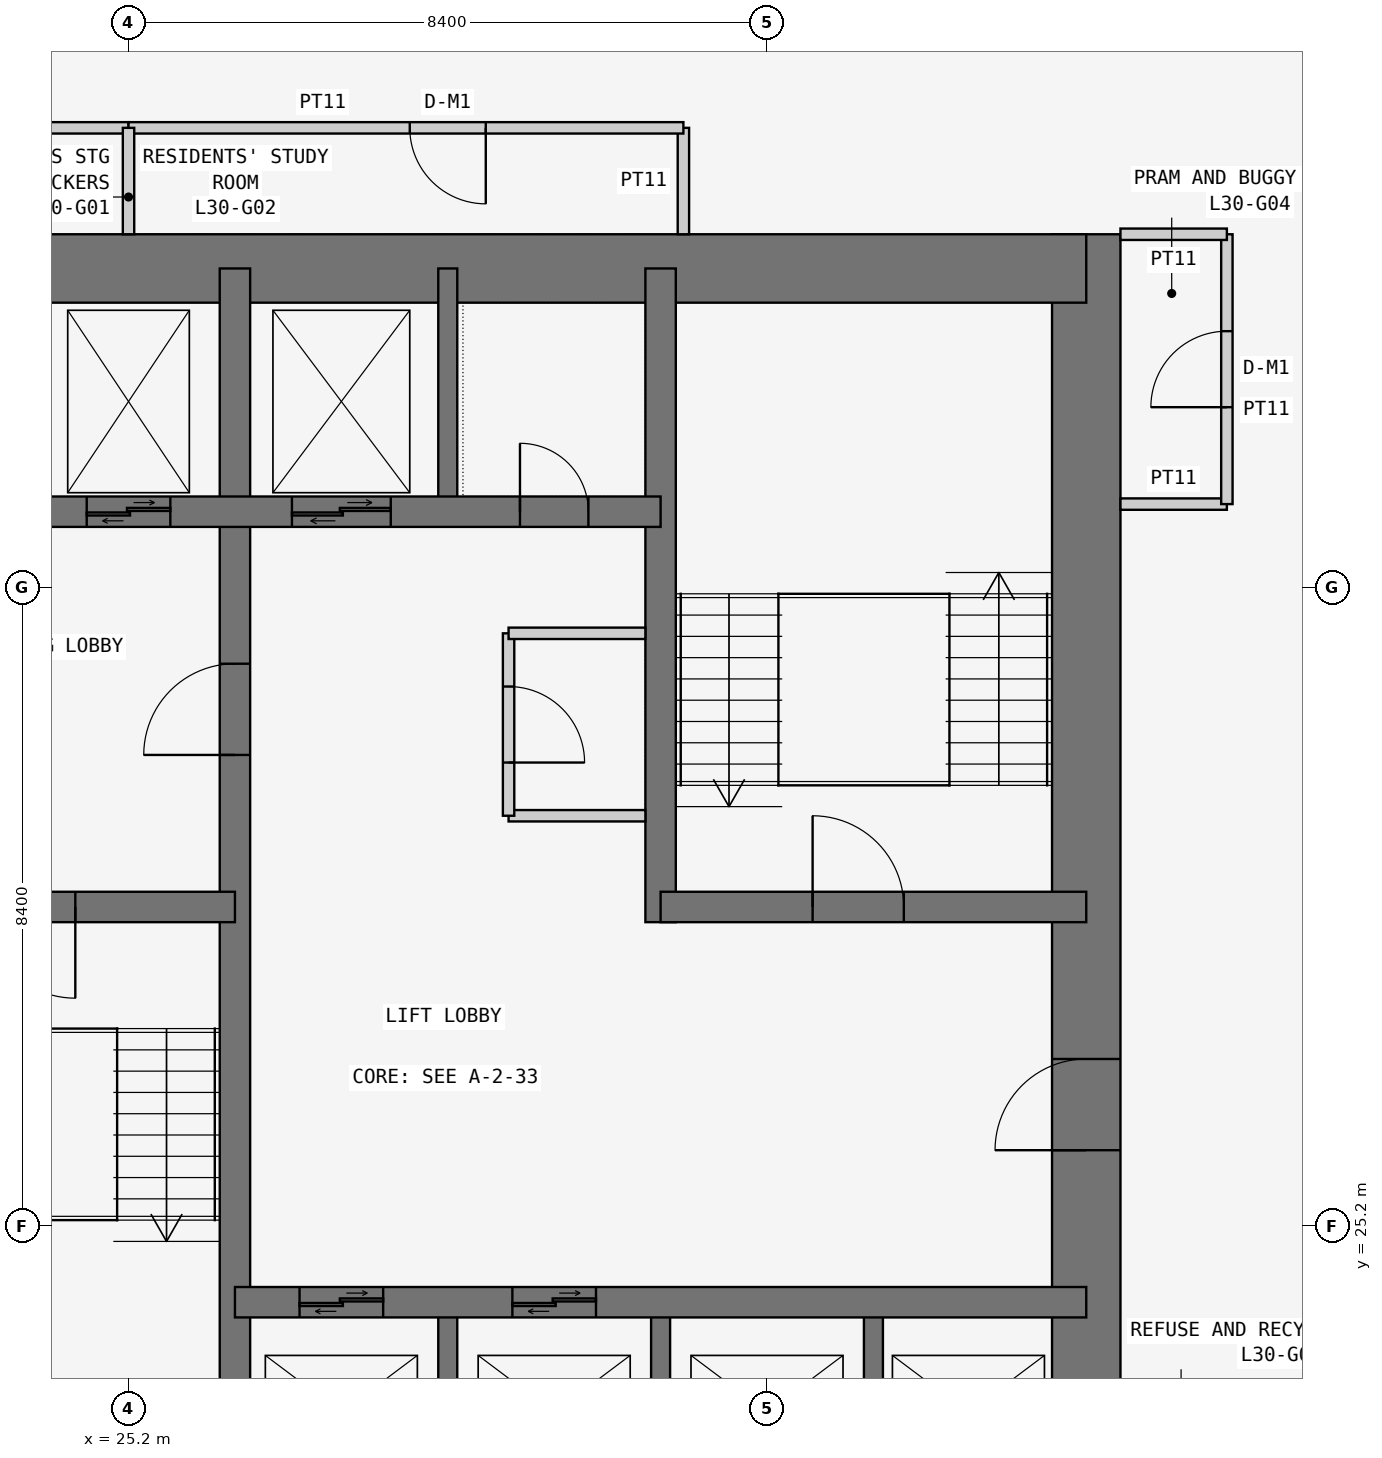
"""IFC4 building model, lengths in metres.
Left out: names, types, materials, properties, quantities, classifications, styles, units other than length and angle.
Written with IfcOpenShell. Run it as: python <this file> out.ifc"""

import sys

from ifc_helpers import new_model, si_unit, direction, frame, frame_2d, origin, place, context, subcontext, project, spatial, rectangle, extrude, element, fill, save


model = new_model("IFC4")
c1 = context("Model", 3, precision=1e-05, world=origin(), true_north=direction((0.0, 1.0)))
c2 = subcontext(c1, "Body", "Model", "MODEL_VIEW")
j1 = project(units=[si_unit("LENGTHUNIT", "METRE"), si_unit("PLANEANGLEUNIT", "RADIAN")], contexts=[c1])
p1 = place(None, origin())
s1 = spatial("IfcSite", under=j1, at=p1, CompositionType="ELEMENT")
p2 = place(p1, origin())
s2 = spatial("IfcBuilding", under=s1, at=p2, CompositionType="ELEMENT")
p3 = place(p2, frame((0.0, 0.0, 119.7)))
s3 = spatial("IfcBuildingStorey", under=s2, at=p3, CompositionType="ELEMENT", Elevation=119.7)
p4 = place(p3, frame((37.8, 21.0, 0.0), z_axis=(0.0, 0.0, 1.0), x_axis=(0.0, 1.0, 0.0)))
e1 = element("IfcWall", 1, at=p4, inside=s3, PredefinedType="SHEAR", context=c2, shape_type="SweptSolid", body=[
    extrude(rectangle(XDim=17.25, YDim=0.9, at=frame_2d((8.625, 0.0))), origin(), (0.0, 0.0, 1.0), 3.6),
])
p5 = place(p4, frame((5.2, 0.0, 0.0)))
e2 = element("IfcOpeningElement", 2, at=p5, cuts=e1, PredefinedType="OPENING", context=c2, shape_type="SweptSolid", body=[
    extrude(rectangle(XDim=1.2, YDim=2.1, at=frame_2d((0.6, 1.05))), frame((0.0, 0.46, 0.0), z_axis=(0.0, -1.0, 0.0), x_axis=(1.0, 0.0, 0.0)), (0.0, 0.0, 1.0), 0.92),
])
p6 = place(p3, frame((37.8, 37.8, 0.0), z_axis=(0.0, 0.0, 1.0), x_axis=(-1.0, 0.0, 0.0)))
e3 = element("IfcWall", 3, at=p6, inside=s3, PredefinedType="SHEAR", context=c2, shape_type="SweptSolid", body=[
    extrude(rectangle(XDim=17.25, YDim=0.9, at=frame_2d((8.625, 0.0))), origin(), (0.0, 0.0, 1.0), 3.6),
])
p7 = place(p3, frame((26.6, 21.0, 0.0), z_axis=(0.0, 0.0, 1.0), x_axis=(0.0, 1.0, 0.0)))
e4 = element("IfcWall", 4, at=p7, inside=s3, PredefinedType="SHEAR", context=c2, shape_type="SweptSolid", body=[
    extrude(rectangle(XDim=16.8, YDim=0.4, at=frame_2d((8.4, 0.0))), origin(), (0.0, 0.0, 1.0), 3.6),
])
p8 = place(p7, frame((10.4, 0.0, 0.0)))
e5 = element("IfcOpeningElement", 5, at=p8, cuts=e4, PredefinedType="OPENING", context=c2, shape_type="SweptSolid", body=[
    extrude(rectangle(XDim=1.2, YDim=2.1, at=frame_2d((0.6, 1.05))), frame((0.0, 0.21, 0.0), z_axis=(0.0, -1.0, 0.0), x_axis=(1.0, 0.0, 0.0)), (0.0, 0.0, 1.0), 0.42),
])
p9 = place(p3, frame((21.0, 29.4, 0.0), z_axis=(0.0, 0.0, 1.0), x_axis=(1.0, 0.0, 0.0)))
e6 = element("IfcWall", 6, at=p9, inside=s3, PredefinedType="SHEAR", context=c2, shape_type="SweptSolid", body=[
    extrude(rectangle(XDim=5.6, YDim=0.4, at=frame_2d((2.8, 0.0))), origin(), (0.0, 0.0, 1.0), 3.6),
])
p10 = place(p9, frame((2.3, 0.0, 0.0)))
e7 = element("IfcOpeningElement", 7, at=p10, cuts=e6, PredefinedType="OPENING", context=c2, shape_type="SweptSolid", body=[
    extrude(rectangle(XDim=1.2, YDim=2.1, at=frame_2d((0.6, 1.05))), frame((0.0, 0.21, 0.0), z_axis=(0.0, -1.0, 0.0), x_axis=(1.0, 0.0, 0.0)), (0.0, 0.0, 1.0), 0.42),
])
p11 = place(p3, frame((21.0, 34.6, 0.0), z_axis=(0.0, 0.0, 1.0), x_axis=(1.0, 0.0, 0.0)))
e8 = element("IfcWall", 8, at=p11, inside=s3, PredefinedType="SHEAR", context=c2, shape_type="SweptSolid", body=[
    extrude(rectangle(XDim=11.2, YDim=0.4, at=frame_2d((5.6, 0.0))), origin(), (0.0, 0.0, 1.0), 3.6),
])
p12 = place(p11, frame((9.35, 0.0, 0.0)))
e9 = element("IfcOpeningElement", 9, at=p12, cuts=e8, PredefinedType="OPENING", context=c2, shape_type="SweptSolid", body=[
    extrude(rectangle(XDim=0.9, YDim=2.1, at=frame_2d((0.45, 1.05))), frame((0.0, 0.21, 0.0), z_axis=(0.0, -1.0, 0.0), x_axis=(1.0, 0.0, 0.0)), (0.0, 0.0, 1.0), 0.42),
])
p13 = place(p11, frame((1.0, 0.0, 0.0)))
e10 = element("IfcOpeningElement", 10, at=p13, cuts=e8, PredefinedType="OPENING", context=c2, shape_type="SweptSolid", body=[
    extrude(rectangle(XDim=1.1, YDim=2.1, at=frame_2d((0.55, 1.05))), frame((0.0, 0.21, 0.0), z_axis=(0.0, -1.0, 0.0), x_axis=(1.0, 0.0, 0.0)), (0.0, 0.0, 1.0), 0.42),
])
p14 = place(p11, frame((3.65, 0.0, 0.0)))
e11 = element("IfcOpeningElement", 11, at=p14, cuts=e8, PredefinedType="OPENING", context=c2, shape_type="SweptSolid", body=[
    extrude(rectangle(XDim=1.1, YDim=2.1, at=frame_2d((0.55, 1.05))), frame((0.0, 0.21, 0.0), z_axis=(0.0, -1.0, 0.0), x_axis=(1.0, 0.0, 0.0)), (0.0, 0.0, 1.0), 0.42),
])
p15 = place(p11, frame((6.35, 0.0, 0.0)))
e12 = element("IfcOpeningElement", 12, at=p15, cuts=e8, PredefinedType="OPENING", context=c2, shape_type="SweptSolid", body=[
    extrude(rectangle(XDim=1.3, YDim=2.1, at=frame_2d((0.65, 1.05))), frame((0.0, 0.21, 0.0), z_axis=(0.0, -1.0, 0.0), x_axis=(1.0, 0.0, 0.0)), (0.0, 0.0, 1.0), 0.42),
])
p16 = place(p3, frame((26.6, 24.2, 0.0), z_axis=(0.0, 0.0, 1.0), x_axis=(1.0, 0.0, 0.0)))
e13 = element("IfcWall", 13, at=p16, inside=s3, PredefinedType="SHEAR", context=c2, shape_type="SweptSolid", body=[
    extrude(rectangle(XDim=11.2, YDim=0.4, at=frame_2d((5.6, 0.0))), origin(), (0.0, 0.0, 1.0), 3.6),
])
p17 = place(p16, frame((0.85, 0.0, 0.0)))
e14 = element("IfcOpeningElement", 14, at=p17, cuts=e13, PredefinedType="OPENING", context=c2, shape_type="SweptSolid", body=[
    extrude(rectangle(XDim=1.1, YDim=2.1, at=frame_2d((0.55, 1.05))), frame((0.0, 0.21, 0.0), z_axis=(0.0, -1.0, 0.0), x_axis=(1.0, 0.0, 0.0)), (0.0, 0.0, 1.0), 0.42),
])
p18 = place(p16, frame((3.65, 0.0, 0.0)))
e15 = element("IfcOpeningElement", 15, at=p18, cuts=e13, PredefinedType="OPENING", context=c2, shape_type="SweptSolid", body=[
    extrude(rectangle(XDim=1.1, YDim=2.1, at=frame_2d((0.55, 1.05))), frame((0.0, 0.21, 0.0), z_axis=(0.0, -1.0, 0.0), x_axis=(1.0, 0.0, 0.0)), (0.0, 0.0, 1.0), 0.42),
])
p19 = place(p3, frame((32.2, 29.2, 0.0), z_axis=(0.0, 0.0, 1.0), x_axis=(0.0, 1.0, 0.0)))
e16 = element("IfcWall", 16, at=p19, inside=s3, PredefinedType="SHEAR", context=c2, shape_type="SweptSolid", body=[
    extrude(rectangle(XDim=8.6, YDim=0.4, at=frame_2d((4.3, 0.0))), origin(), (0.0, 0.0, 1.0), 3.6),
])
p20 = place(p3, frame((32.2, 29.4, 0.0), z_axis=(0.0, 0.0, 1.0), x_axis=(1.0, 0.0, 0.0)))
e17 = element("IfcWall", 17, at=p20, inside=s3, PredefinedType="SHEAR", context=c2, shape_type="SweptSolid", body=[
    extrude(rectangle(XDim=5.6, YDim=0.4, at=frame_2d((2.8, 0.0))), origin(), (0.0, 0.0, 1.0), 3.6),
])
p21 = place(p20, frame((2.0, 0.0, 0.0)))
e18 = element("IfcOpeningElement", 18, at=p21, cuts=e17, PredefinedType="OPENING", context=c2, shape_type="SweptSolid", body=[
    extrude(rectangle(XDim=1.2, YDim=2.1, at=frame_2d((0.6, 1.05))), frame((0.0, 0.21, 0.0), z_axis=(0.0, -1.0, 0.0), x_axis=(1.0, 0.0, 0.0)), (0.0, 0.0, 1.0), 0.42),
])
for number, where, z_axis, x_axis in (
    (19, (29.4, 21.0, 0.0), (0.0, 0.0, 1.0), (0.0, 1.0, 0.0)),
    (20, (32.2, 21.0, 0.0), (0.0, 0.0, 1.0), (0.0, 1.0, 0.0)),
    (21, (35.0, 21.0, 0.0), (0.0, 0.0, 1.0), (0.0, 1.0, 0.0)),
    (22, (29.4, 34.6, 0.0), (0.0, 0.0, 1.0), (0.0, 1.0, 0.0)),
):
    element("IfcWall", number, at=place(p3, frame(where, z_axis=z_axis, x_axis=x_axis)), inside=s3, PredefinedType="SHEAR", context=c2, shape_type="SweptSolid", body=[
        extrude(rectangle(XDim=3.2, YDim=0.25, at=frame_2d((1.6, 0.0))), origin(), (0.0, 0.0, 1.0), 3.6),
    ])
p22 = place(p3, frame((25.2, 39.65, 0.0), z_axis=(0.0, 0.0, 1.0), x_axis=(-1.0, 0.0, 0.0)))
e23 = element("IfcWall", 23, at=p22, inside=s3, PredefinedType="PARTITIONING", context=c2, shape_type="SweptSolid", body=[
    extrude(rectangle(XDim=4.65, YDim=0.15, at=frame_2d((2.325, 0.0))), origin(), (0.0, 0.0, 1.0), 3.45),
])
p23 = place(p22, frame((2.375, 0.0, 0.0)))
e24 = element("IfcOpeningElement", 24, at=p23, cuts=e23, PredefinedType="OPENING", context=c2, shape_type="SweptSolid", body=[
    extrude(rectangle(XDim=1.0, YDim=2.1, at=frame_2d((0.5, 1.05))), frame((0.0, 0.085, 0.0), z_axis=(0.0, -1.0, 0.0), x_axis=(1.0, 0.0, 0.0)), (0.0, 0.0, 1.0), 0.17),
])
p24 = place(p3, frame((32.5, 38.25, 0.0), z_axis=(0.0, 0.0, 1.0), x_axis=(0.0, 1.0, 0.0)))
e25 = element("IfcWall", 25, at=p24, inside=s3, PredefinedType="PARTITIONING", context=c2, shape_type="SweptSolid", body=[
    extrude(rectangle(XDim=1.4, YDim=0.15, at=frame_2d((0.7, 0.0))), origin(), (0.0, 0.0, 1.0), 3.45),
])
p25 = place(p3, frame((32.5, 39.65, 0.0), z_axis=(0.0, 0.0, 1.0), x_axis=(-1.0, 0.0, 0.0)))
e26 = element("IfcWall", 26, at=p25, inside=s3, PredefinedType="PARTITIONING", context=c2, shape_type="SweptSolid", body=[
    extrude(rectangle(XDim=7.3, YDim=0.15, at=frame_2d((3.65, 0.0))), origin(), (0.0, 0.0, 1.0), 3.45),
])
p26 = place(p25, frame((2.6, 0.0, 0.0)))
e27 = element("IfcOpeningElement", 27, at=p26, cuts=e26, PredefinedType="OPENING", context=c2, shape_type="SweptSolid", body=[
    extrude(rectangle(XDim=1.0, YDim=2.1, at=frame_2d((0.5, 1.05))), frame((0.0, 0.085, 0.0), z_axis=(0.0, -1.0, 0.0), x_axis=(1.0, 0.0, 0.0)), (0.0, 0.0, 1.0), 0.17),
])
p27 = place(p3, frame((38.25, 34.7, 0.0), z_axis=(0.0, 0.0, 1.0), x_axis=(1.0, 0.0, 0.0)))
e28 = element("IfcWall", 28, at=p27, inside=s3, PredefinedType="PARTITIONING", context=c2, shape_type="SweptSolid", body=[
    extrude(rectangle(XDim=1.4, YDim=0.15, at=frame_2d((0.7, 0.0))), origin(), (0.0, 0.0, 1.0), 3.45),
])
p28 = place(p3, frame((39.65, 34.7, 0.0), z_axis=(0.0, 0.0, 1.0), x_axis=(0.0, 1.0, 0.0)))
e29 = element("IfcWall", 29, at=p28, inside=s3, PredefinedType="PARTITIONING", context=c2, shape_type="SweptSolid", body=[
    extrude(rectangle(XDim=3.55, YDim=0.15, at=frame_2d((1.775, 0.0))), origin(), (0.0, 0.0, 1.0), 3.45),
])
p29 = place(p28, frame((1.275, 0.0, 0.0)))
e30 = element("IfcOpeningElement", 30, at=p29, cuts=e29, PredefinedType="OPENING", context=c2, shape_type="SweptSolid", body=[
    extrude(rectangle(XDim=1.0, YDim=2.1, at=frame_2d((0.5, 1.05))), frame((0.0, 0.085, 0.0), z_axis=(0.0, -1.0, 0.0), x_axis=(1.0, 0.0, 0.0)), (0.0, 0.0, 1.0), 0.17),
])
p30 = place(p3, frame((39.65, 38.25, 0.0), z_axis=(0.0, 0.0, 1.0), x_axis=(-1.0, 0.0, 0.0)))
e31 = element("IfcWall", 31, at=p30, inside=s3, PredefinedType="PARTITIONING", context=c2, shape_type="SweptSolid", body=[
    extrude(rectangle(XDim=1.4, YDim=0.15, at=frame_2d((0.7, 0.0))), origin(), (0.0, 0.0, 1.0), 3.45),
])
p31 = place(p3, frame((25.2, 38.25, 0.0), z_axis=(0.0, 0.0, 1.0), x_axis=(0.0, 1.0, 0.0)))
e32 = element("IfcWall", 32, at=p31, inside=s3, PredefinedType="PARTITIONING", context=c2, shape_type="SweptSolid", body=[
    extrude(rectangle(XDim=1.4, YDim=0.15, at=frame_2d((0.7, 0.0))), origin(), (0.0, 0.0, 1.0), 2.767),
])
p32 = place(p3, frame((32.0, 30.6, 0.0), z_axis=(0.0, 0.0, 1.0), x_axis=(-1.0, 0.0, 0.0)))
e33 = element("IfcWall", 33, at=p32, inside=s3, PredefinedType="PARTITIONING", context=c2, shape_type="SweptSolid", body=[
    extrude(rectangle(XDim=1.8, YDim=0.15, at=frame_2d((0.9, 0.0))), origin(), (0.0, 0.0, 1.0), 3.45),
])
p33 = place(p3, frame((30.2, 30.6, 0.0), z_axis=(0.0, 0.0, 1.0), x_axis=(0.0, 1.0, 0.0)))
e34 = element("IfcWall", 34, at=p33, inside=s3, PredefinedType="PARTITIONING", context=c2, shape_type="SweptSolid", body=[
    extrude(rectangle(XDim=2.4, YDim=0.15, at=frame_2d((1.2, 0.0))), origin(), (0.0, 0.0, 1.0), 3.45),
])
p34 = place(p33, frame((0.7, 0.0, 0.0)))
e35 = element("IfcOpeningElement", 35, at=p34, cuts=e34, PredefinedType="OPENING", context=c2, shape_type="SweptSolid", body=[
    extrude(rectangle(XDim=1.0, YDim=2.1, at=frame_2d((0.5, 1.05))), frame((0.0, 0.085, 0.0), z_axis=(0.0, -1.0, 0.0), x_axis=(1.0, 0.0, 0.0)), (0.0, 0.0, 1.0), 0.17),
])
p35 = place(p3, frame((30.2, 33.0, 0.0), z_axis=(0.0, 0.0, 1.0), x_axis=(1.0, 0.0, 0.0)))
e36 = element("IfcWall", 36, at=p35, inside=s3, PredefinedType="PARTITIONING", context=c2, shape_type="SweptSolid", body=[
    extrude(rectangle(XDim=1.8, YDim=0.15, at=frame_2d((0.9, 0.0))), origin(), (0.0, 0.0, 1.0), 3.45),
])
p36 = place(p26, origin())
e37 = element("IfcDoor", 37, at=p36, inside=s3, OperationType="SINGLE_SWING_LEFT", PredefinedType="DOOR", context=c2, shape_type="SweptSolid", body=[
    extrude(rectangle(XDim=1.0, YDim=2.1, at=frame_2d((0.5, 1.05))), frame((0.0, 0.025, 0.0), z_axis=(0.0, -1.0, 0.0), x_axis=(1.0, 0.0, 0.0)), (0.0, 0.0, 1.0), 0.05),
])
fill(e27, e37)
p37 = place(p29, origin())
e38 = element("IfcDoor", 38, at=p37, inside=s3, OperationType="SINGLE_SWING_LEFT", PredefinedType="DOOR", context=c2, shape_type="SweptSolid", body=[
    extrude(rectangle(XDim=1.0, YDim=2.1, at=frame_2d((0.5, 1.05))), frame((0.0, 0.025, 0.0), z_axis=(0.0, -1.0, 0.0), x_axis=(1.0, 0.0, 0.0)), (0.0, 0.0, 1.0), 0.05),
])
fill(e30, e38)
p38 = place(p10, frame((1.2, 0.0, 0.0), z_axis=(0.0, 0.0, 1.0), x_axis=(-1.0, 0.0, 0.0)))
e39 = element("IfcDoor", 39, at=p38, inside=s3, OperationType="SINGLE_SWING_LEFT", PredefinedType="DOOR", context=c2, shape_type="SweptSolid", body=[
    extrude(rectangle(XDim=1.2, YDim=2.1, at=frame_2d((0.6, 1.05))), frame((0.0, 0.025, 0.0), z_axis=(0.0, -1.0, 0.0), x_axis=(1.0, 0.0, 0.0)), (0.0, 0.0, 1.0), 0.05),
])
fill(e7, e39)
p39 = place(p8, origin())
e40 = element("IfcDoor", 40, at=p39, inside=s3, OperationType="SINGLE_SWING_LEFT", PredefinedType="DOOR", context=c2, shape_type="SweptSolid", body=[
    extrude(rectangle(XDim=1.2, YDim=2.1, at=frame_2d((0.6, 1.05))), frame((0.0, 0.025, 0.0), z_axis=(0.0, -1.0, 0.0), x_axis=(1.0, 0.0, 0.0)), (0.0, 0.0, 1.0), 0.05),
])
fill(e5, e40)
p40 = place(p5, origin())
e41 = element("IfcDoor", 41, at=p40, inside=s3, OperationType="SINGLE_SWING_LEFT", PredefinedType="DOOR", context=c2, shape_type="SweptSolid", body=[
    extrude(rectangle(XDim=1.2, YDim=2.1, at=frame_2d((0.6, 1.05))), frame((0.0, 0.025, 0.0), z_axis=(0.0, -1.0, 0.0), x_axis=(1.0, 0.0, 0.0)), (0.0, 0.0, 1.0), 0.05),
])
fill(e2, e41)
p41 = place(p21, origin())
e42 = element("IfcDoor", 42, at=p41, inside=s3, OperationType="SINGLE_SWING_LEFT", PredefinedType="DOOR", context=c2, shape_type="SweptSolid", body=[
    extrude(rectangle(XDim=1.2, YDim=2.1, at=frame_2d((0.6, 1.05))), frame((0.0, 0.025, 0.0), z_axis=(0.0, -1.0, 0.0), x_axis=(1.0, 0.0, 0.0)), (0.0, 0.0, 1.0), 0.05),
])
fill(e18, e42)
p42 = place(p12, origin())
e43 = element("IfcDoor", 43, at=p42, inside=s3, OperationType="SINGLE_SWING_LEFT", PredefinedType="DOOR", context=c2, shape_type="SweptSolid", body=[
    extrude(rectangle(XDim=0.9, YDim=2.1, at=frame_2d((0.45, 1.05))), frame((0.0, 0.025, 0.0), z_axis=(0.0, -1.0, 0.0), x_axis=(1.0, 0.0, 0.0)), (0.0, 0.0, 1.0), 0.05),
])
fill(e9, e43)
p43 = place(p34, frame((1.0, 0.0, 0.0), z_axis=(0.0, 0.0, 1.0), x_axis=(-1.0, 0.0, 0.0)))
e44 = element("IfcDoor", 44, at=p43, inside=s3, OperationType="SINGLE_SWING_RIGHT", PredefinedType="DOOR", context=c2, shape_type="SweptSolid", body=[
    extrude(rectangle(XDim=1.0, YDim=2.1, at=frame_2d((0.5, 1.05))), frame((0.0, 0.025, 0.0), z_axis=(0.0, -1.0, 0.0), x_axis=(1.0, 0.0, 0.0)), (0.0, 0.0, 1.0), 0.05),
])
fill(e35, e44)
p44 = place(p17, origin())
e45 = element("IfcDoor", 45, at=p44, inside=s3, OperationType="DOUBLE_DOOR_SLIDING", PredefinedType="DOOR", context=c2, shape_type="SweptSolid", body=[
    extrude(rectangle(XDim=1.1, YDim=2.1, at=frame_2d((0.55, 1.05))), frame((0.0, 0.025, 0.0), z_axis=(0.0, -1.0, 0.0), x_axis=(1.0, 0.0, 0.0)), (0.0, 0.0, 1.0), 0.05),
])
fill(e14, e45)
p45 = place(p18, origin())
e46 = element("IfcDoor", 46, at=p45, inside=s3, OperationType="DOUBLE_DOOR_SLIDING", PredefinedType="DOOR", context=c2, shape_type="SweptSolid", body=[
    extrude(rectangle(XDim=1.1, YDim=2.1, at=frame_2d((0.55, 1.05))), frame((0.0, 0.025, 0.0), z_axis=(0.0, -1.0, 0.0), x_axis=(1.0, 0.0, 0.0)), (0.0, 0.0, 1.0), 0.05),
])
fill(e15, e46)
p46 = place(p14, origin())
e47 = element("IfcDoor", 47, at=p46, inside=s3, OperationType="DOUBLE_DOOR_SLIDING", PredefinedType="DOOR", context=c2, shape_type="SweptSolid", body=[
    extrude(rectangle(XDim=1.1, YDim=2.1, at=frame_2d((0.55, 1.05))), frame((0.0, 0.025, 0.0), z_axis=(0.0, -1.0, 0.0), x_axis=(1.0, 0.0, 0.0)), (0.0, 0.0, 1.0), 0.05),
])
fill(e11, e47)
p47 = place(p15, origin())
e48 = element("IfcDoor", 48, at=p47, inside=s3, OperationType="DOUBLE_DOOR_SLIDING", PredefinedType="DOOR", context=c2, shape_type="SweptSolid", body=[
    extrude(rectangle(XDim=1.3, YDim=2.1, at=frame_2d((0.65, 1.05))), frame((0.0, 0.025, 0.0), z_axis=(0.0, -1.0, 0.0), x_axis=(1.0, 0.0, 0.0)), (0.0, 0.0, 1.0), 0.05),
])
fill(e12, e48)
save(model, sys.argv[1])
